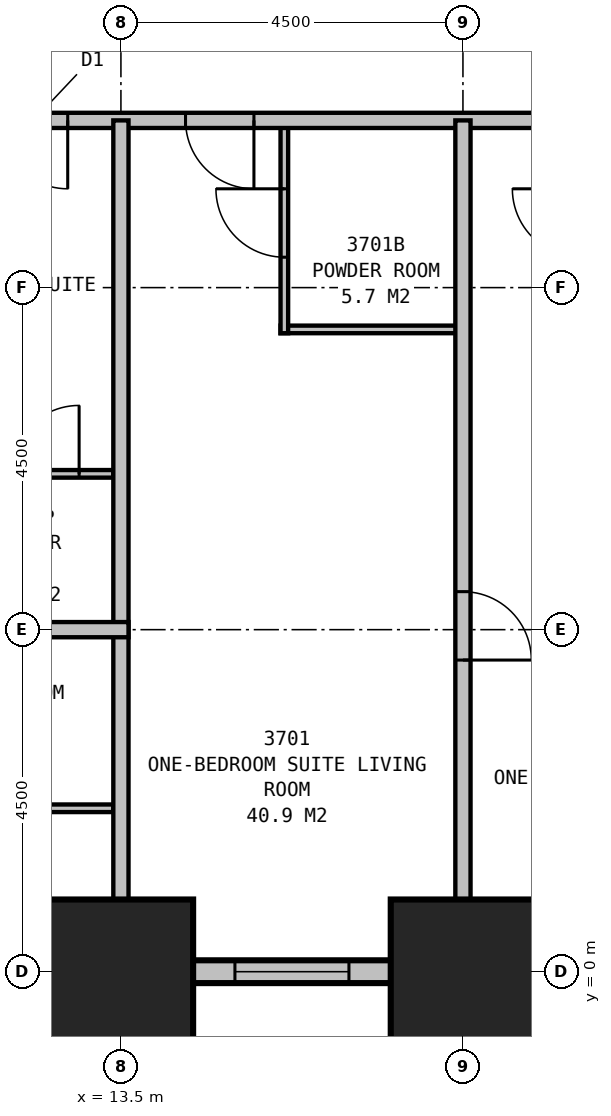
"""IFC4 building model, lengths in metres.
Left out: names, types, materials, properties, quantities, classifications, styles, units other than length and angle.
Written with IfcOpenShell. Run it as: python <this file> out.ifc"""

import sys

from ifc_helpers import new_model, si_unit, direction, frame, frame_2d, origin, origin_2d, place, context, subcontext, project, spatial, rectangle, extrude, element, fill, save


model = new_model("IFC4")
c1 = context("Model", 3, precision=1e-05, world=origin(), true_north=direction((0.0, 1.0)))
c2 = subcontext(c1, "Body", "Model", "MODEL_VIEW")
j1 = project(units=[si_unit("LENGTHUNIT", "METRE"), si_unit("PLANEANGLEUNIT", "RADIAN")], contexts=[c1])
p1 = place(None, origin())
s1 = spatial("IfcSite", under=j1, at=p1, CompositionType="ELEMENT")
p2 = place(p1, origin())
s2 = spatial("IfcBuilding", under=s1, at=p2, CompositionType="ELEMENT")
p3 = place(p2, frame((0.0, 0.0, 142.4)))
s3 = spatial("IfcBuildingStorey", under=s2, at=p3, CompositionType="ELEMENT", Elevation=142.4)
for number, where, z_axis, x_axis in (
    (1, (13.5, 0.0, 0.0), (0.0, 0.0, 1.0), (1.0, 0.0, 0.0)),
    (2, (18.0, 0.0, 0.0), (0.0, 0.0, 1.0), (1.0, 0.0, 0.0)),
):
    element("IfcColumn", number, at=place(p3, frame(where, z_axis=z_axis, x_axis=x_axis)), inside=s3, PredefinedType="COLUMN", context=c2, shape_type="SweptSolid", body=[
        extrude(rectangle(XDim=1.9, YDim=1.9, at=origin_2d()), origin(), (0.0, 0.0, 1.0), 3.5),
    ])
p4 = place(p3, frame((4.35, 0.0, 0.0), z_axis=(0.0, 0.0, 1.0), x_axis=(1.0, 0.0, 0.0)))
e3 = element("IfcWall", 3, at=p4, inside=s3, PredefinedType="STANDARD", context=c2, shape_type="SweptSolid", body=[
    extrude(rectangle(XDim=40.8, YDim=0.3, at=frame_2d((20.4, 0.0))), origin(), (0.0, 0.0, 1.0), 2.1),
])
p5 = place(p4, frame((1.65, 0.0, 0.5)))
e4 = element("IfcOpeningElement", 4, at=p5, cuts=e3, PredefinedType="OPENING", context=c2, shape_type="SweptSolid", body=[
    extrude(rectangle(XDim=1.5, YDim=1.4, at=frame_2d((0.75, 0.7))), frame((0.0, 0.16, 0.0), z_axis=(0.0, -1.0, 0.0), x_axis=(1.0, 0.0, 0.0)), (0.0, 0.0, 1.0), 0.32),
])
p6 = place(p4, frame((6.15, 0.0, 0.5)))
e5 = element("IfcOpeningElement", 5, at=p6, cuts=e3, PredefinedType="OPENING", context=c2, shape_type="SweptSolid", body=[
    extrude(rectangle(XDim=1.5, YDim=1.4, at=frame_2d((0.75, 0.7))), frame((0.0, 0.16, 0.0), z_axis=(0.0, -1.0, 0.0), x_axis=(1.0, 0.0, 0.0)), (0.0, 0.0, 1.0), 0.32),
])
p7 = place(p4, frame((10.65, 0.0, 0.5)))
e6 = element("IfcOpeningElement", 6, at=p7, cuts=e3, PredefinedType="OPENING", context=c2, shape_type="SweptSolid", body=[
    extrude(rectangle(XDim=1.5, YDim=1.4, at=frame_2d((0.75, 0.7))), frame((0.0, 0.16, 0.0), z_axis=(0.0, -1.0, 0.0), x_axis=(1.0, 0.0, 0.0)), (0.0, 0.0, 1.0), 0.32),
])
p8 = place(p4, frame((15.15, 0.0, 0.5)))
e7 = element("IfcOpeningElement", 7, at=p8, cuts=e3, PredefinedType="OPENING", context=c2, shape_type="SweptSolid", body=[
    extrude(rectangle(XDim=1.5, YDim=1.4, at=frame_2d((0.75, 0.7))), frame((0.0, 0.16, 0.0), z_axis=(0.0, -1.0, 0.0), x_axis=(1.0, 0.0, 0.0)), (0.0, 0.0, 1.0), 0.32),
])
p9 = place(p4, frame((19.65, 0.0, 0.5)))
e8 = element("IfcOpeningElement", 8, at=p9, cuts=e3, PredefinedType="OPENING", context=c2, shape_type="SweptSolid", body=[
    extrude(rectangle(XDim=1.5, YDim=1.4, at=frame_2d((0.75, 0.7))), frame((0.0, 0.16, 0.0), z_axis=(0.0, -1.0, 0.0), x_axis=(1.0, 0.0, 0.0)), (0.0, 0.0, 1.0), 0.32),
])
p10 = place(p4, frame((24.15, 0.0, 0.5)))
e9 = element("IfcOpeningElement", 9, at=p10, cuts=e3, PredefinedType="OPENING", context=c2, shape_type="SweptSolid", body=[
    extrude(rectangle(XDim=1.5, YDim=1.4, at=frame_2d((0.75, 0.7))), frame((0.0, 0.16, 0.0), z_axis=(0.0, -1.0, 0.0), x_axis=(1.0, 0.0, 0.0)), (0.0, 0.0, 1.0), 0.32),
])
p11 = place(p4, frame((28.65, 0.0, 0.5)))
e10 = element("IfcOpeningElement", 10, at=p11, cuts=e3, PredefinedType="OPENING", context=c2, shape_type="SweptSolid", body=[
    extrude(rectangle(XDim=1.5, YDim=1.4, at=frame_2d((0.75, 0.7))), frame((0.0, 0.16, 0.0), z_axis=(0.0, -1.0, 0.0), x_axis=(1.0, 0.0, 0.0)), (0.0, 0.0, 1.0), 0.32),
])
p12 = place(p4, frame((33.15, 0.0, 0.5)))
e11 = element("IfcOpeningElement", 11, at=p12, cuts=e3, PredefinedType="OPENING", context=c2, shape_type="SweptSolid", body=[
    extrude(rectangle(XDim=1.5, YDim=1.4, at=frame_2d((0.75, 0.7))), frame((0.0, 0.16, 0.0), z_axis=(0.0, -1.0, 0.0), x_axis=(1.0, 0.0, 0.0)), (0.0, 0.0, 1.0), 0.32),
])
p13 = place(p4, frame((37.65, 0.0, 0.5)))
e12 = element("IfcOpeningElement", 12, at=p13, cuts=e3, PredefinedType="OPENING", context=c2, shape_type="SweptSolid", body=[
    extrude(rectangle(XDim=1.5, YDim=1.4, at=frame_2d((0.75, 0.7))), frame((0.0, 0.16, 0.0), z_axis=(0.0, -1.0, 0.0), x_axis=(1.0, 0.0, 0.0)), (0.0, 0.0, 1.0), 0.32),
])
p14 = place(p3, frame((11.2, 11.2, 0.0), z_axis=(0.0, 0.0, 1.0), x_axis=(1.0, 0.0, 0.0)))
e13 = element("IfcWall", 13, at=p14, inside=s3, PredefinedType="PARTITIONING", context=c2, shape_type="SweptSolid", body=[
    extrude(rectangle(XDim=27.1, YDim=0.2, at=frame_2d((13.55, 0.0))), origin(), (0.0, 0.0, 1.0), 3.25),
])
p15 = place(p14, frame((4.05, 0.0, 0.0), z_axis=(0.0, 0.0, 1.0), x_axis=(-1.0, 0.0, 0.0)))
e14 = element("IfcOpeningElement", 14, at=p15, cuts=e13, PredefinedType="OPENING", context=c2, shape_type="SweptSolid", body=[
    extrude(rectangle(XDim=0.9, YDim=2.1, at=frame_2d((0.45, 1.05))), frame((0.0, 0.11, 0.0), z_axis=(0.0, -1.0, 0.0), x_axis=(1.0, 0.0, 0.0)), (0.0, 0.0, 1.0), 0.22),
])
p16 = place(p14, frame((12.65, 0.0, 0.0), z_axis=(0.0, 0.0, 1.0), x_axis=(-1.0, 0.0, 0.0)))
e15 = element("IfcOpeningElement", 15, at=p16, cuts=e13, PredefinedType="OPENING", context=c2, shape_type="SweptSolid", body=[
    extrude(rectangle(XDim=1.0, YDim=2.1, at=frame_2d((0.5, 1.05))), frame((0.0, 0.11, 0.0), z_axis=(0.0, -1.0, 0.0), x_axis=(1.0, 0.0, 0.0)), (0.0, 0.0, 1.0), 0.22),
])
p17 = place(p14, frame((19.45, 0.0, 0.0), z_axis=(0.0, 0.0, 1.0), x_axis=(-1.0, 0.0, 0.0)))
e16 = element("IfcOpeningElement", 16, at=p17, cuts=e13, PredefinedType="OPENING", context=c2, shape_type="SweptSolid", body=[
    extrude(rectangle(XDim=0.9, YDim=2.1, at=frame_2d((0.45, 1.05))), frame((0.0, 0.11, 0.0), z_axis=(0.0, -1.0, 0.0), x_axis=(1.0, 0.0, 0.0)), (0.0, 0.0, 1.0), 0.22),
])
p18 = place(p14, frame((1.6, 0.0, 0.0), z_axis=(0.0, 0.0, 1.0), x_axis=(-1.0, 0.0, 0.0)))
e17 = element("IfcOpeningElement", 17, at=p18, cuts=e13, PredefinedType="OPENING", context=c2, shape_type="SweptSolid", body=[
    extrude(rectangle(XDim=0.9, YDim=2.1, at=frame_2d((0.45, 1.05))), frame((0.0, 0.11, 0.0), z_axis=(0.0, -1.0, 0.0), x_axis=(1.0, 0.0, 0.0)), (0.0, 0.0, 1.0), 0.22),
])
p19 = place(p14, frame((26.4, 0.0, 0.0), z_axis=(0.0, 0.0, 1.0), x_axis=(-1.0, 0.0, 0.0)))
e18 = element("IfcOpeningElement", 18, at=p19, cuts=e13, PredefinedType="OPENING", context=c2, shape_type="SweptSolid", body=[
    extrude(rectangle(XDim=0.9, YDim=2.1, at=frame_2d((0.45, 1.05))), frame((0.0, 0.11, 0.0), z_axis=(0.0, -1.0, 0.0), x_axis=(1.0, 0.0, 0.0)), (0.0, 0.0, 1.0), 0.22),
])
p20 = place(p3, frame((18.0, 11.2, 0.0), z_axis=(0.0, 0.0, 1.0), x_axis=(0.0, -1.0, 0.0)))
e19 = element("IfcWall", 19, at=p20, inside=s3, PredefinedType="PARTITIONING", context=c2, shape_type="SweptSolid", body=[
    extrude(rectangle(XDim=11.2, YDim=0.2, at=frame_2d((5.6, 0.0))), origin(), (0.0, 0.0, 1.0), 2.2),
])
p21 = place(p20, frame((6.2, 0.0, 0.0)))
e20 = element("IfcOpeningElement", 20, at=p21, cuts=e19, PredefinedType="OPENING", context=c2, shape_type="SweptSolid", body=[
    extrude(rectangle(XDim=0.9, YDim=2.1, at=frame_2d((0.45, 1.05))), frame((0.0, 0.11, 0.0), z_axis=(0.0, -1.0, 0.0), x_axis=(1.0, 0.0, 0.0)), (0.0, 0.0, 1.0), 0.22),
])
p22 = place(p3, frame((15.6, 8.45, 0.0), z_axis=(0.0, 0.0, 1.0), x_axis=(1.0, 0.0, 0.0)))
e21 = element("IfcWall", 21, at=p22, inside=s3, PredefinedType="PLUMBINGWALL", context=c2, shape_type="SweptSolid", body=[
    extrude(rectangle(XDim=2.4, YDim=0.1, at=frame_2d((1.2, 0.0))), origin(), (0.0, 0.0, 1.0), 3.25),
])
p23 = place(p3, frame((15.65, 11.2, 0.0), z_axis=(0.0, 0.0, 1.0), x_axis=(0.0, -1.0, 0.0)))
e22 = element("IfcWall", 22, at=p23, inside=s3, PredefinedType="PLUMBINGWALL", context=c2, shape_type="SweptSolid", body=[
    extrude(rectangle(XDim=2.8, YDim=0.1, at=frame_2d((1.4, 0.0))), origin(), (0.0, 0.0, 1.0), 3.25),
])
p24 = place(p23, frame((1.8, 0.0, 0.0), z_axis=(0.0, 0.0, 1.0), x_axis=(-1.0, 0.0, 0.0)))
e23 = element("IfcOpeningElement", 23, at=p24, cuts=e22, PredefinedType="OPENING", context=c2, shape_type="SweptSolid", body=[
    extrude(rectangle(XDim=0.9, YDim=2.1, at=frame_2d((0.45, 1.05))), frame((0.0, 0.06, 0.0), z_axis=(0.0, -1.0, 0.0), x_axis=(1.0, 0.0, 0.0)), (0.0, 0.0, 1.0), 0.12),
])
p25 = place(p3, frame((13.5, 11.2, 0.0), z_axis=(0.0, 0.0, 1.0), x_axis=(0.0, -1.0, 0.0)))
e24 = element("IfcWall", 24, at=p25, inside=s3, PredefinedType="PARTITIONING", context=c2, shape_type="SweptSolid", body=[
    extrude(rectangle(XDim=11.2, YDim=0.2, at=frame_2d((5.6, 0.0))), origin(), (0.0, 0.0, 1.0), 2.2),
])
p26 = place(p3, frame((13.6, 4.5, 0.0), z_axis=(0.0, 0.0, 1.0), x_axis=(-1.0, 0.0, 0.0)))
e25 = element("IfcWall", 25, at=p26, inside=s3, PredefinedType="PARTITIONING", context=c2, shape_type="SweptSolid", body=[
    extrude(rectangle(XDim=9.1, YDim=0.2, at=frame_2d((4.55, 0.0))), origin(), (0.0, 0.0, 1.0), 3.25),
])
p27 = place(p26, frame((7.1, 0.0, 0.0)))
e26 = element("IfcOpeningElement", 26, at=p27, cuts=e25, PredefinedType="OPENING", context=c2, shape_type="SweptSolid", body=[
    extrude(rectangle(XDim=0.9, YDim=2.1, at=frame_2d((0.45, 1.05))), frame((0.0, 0.11, 0.0), z_axis=(0.0, -1.0, 0.0), x_axis=(1.0, 0.0, 0.0)), (0.0, 0.0, 1.0), 0.22),
])
p28 = place(p3, frame((13.4, 6.55, 0.0), z_axis=(0.0, 0.0, 1.0), x_axis=(-1.0, 0.0, 0.0)))
e27 = element("IfcWall", 27, at=p28, inside=s3, PredefinedType="PLUMBINGWALL", context=c2, shape_type="SweptSolid", body=[
    extrude(rectangle(XDim=1.8, YDim=0.1, at=frame_2d((0.9, 0.0))), origin(), (0.0, 0.0, 1.0), 3.25),
])
p29 = place(p28, frame((1.35, 0.0, 0.0), z_axis=(0.0, 0.0, 1.0), x_axis=(-1.0, 0.0, 0.0)))
e28 = element("IfcOpeningElement", 28, at=p29, cuts=e27, PredefinedType="OPENING", context=c2, shape_type="SweptSolid", body=[
    extrude(rectangle(XDim=0.9, YDim=2.1, at=frame_2d((0.45, 1.05))), frame((0.0, 0.06, 0.0), z_axis=(0.0, -1.0, 0.0), x_axis=(1.0, 0.0, 0.0)), (0.0, 0.0, 1.0), 0.12),
])
p30 = place(p3, frame((13.4, 2.15, 0.0), z_axis=(0.0, 0.0, 1.0), x_axis=(-1.0, 0.0, 0.0)))
e29 = element("IfcWall", 29, at=p30, inside=s3, PredefinedType="PLUMBINGWALL", context=c2, shape_type="SweptSolid", body=[
    extrude(rectangle(XDim=3.5, YDim=0.1, at=frame_2d((1.75, 0.0))), origin(), (0.0, 0.0, 1.0), 3.25),
])
p31 = place(p30, frame((0.9, 0.0, 0.0)))
e30 = element("IfcOpeningElement", 30, at=p31, cuts=e29, PredefinedType="OPENING", context=c2, shape_type="SweptSolid", body=[
    extrude(rectangle(XDim=0.9, YDim=2.1, at=frame_2d((0.45, 1.05))), frame((0.0, 0.06, 0.0), z_axis=(0.0, -1.0, 0.0), x_axis=(1.0, 0.0, 0.0)), (0.0, 0.0, 1.0), 0.12),
])
p32 = place(p7, origin())
e31 = element("IfcWindow", 31, at=p32, inside=s3, PartitioningType="SINGLE_PANEL", PredefinedType="WINDOW", context=c2, shape_type="SweptSolid", body=[
    extrude(rectangle(XDim=1.5, YDim=1.4, at=frame_2d((0.75, 0.7))), frame((0.0, 0.03, 0.0), z_axis=(0.0, -1.0, 0.0), x_axis=(1.0, 0.0, 0.0)), (0.0, 0.0, 1.0), 0.06),
])
fill(e6, e31)
p33 = place(p15, origin())
e32 = element("IfcDoor", 32, at=p33, inside=s3, OperationType="SINGLE_SWING_LEFT", PredefinedType="DOOR", context=c2, shape_type="SweptSolid", body=[
    extrude(rectangle(XDim=0.9, YDim=2.1, at=frame_2d((0.45, 1.05))), frame((0.0, 0.025, 0.0), z_axis=(0.0, -1.0, 0.0), x_axis=(1.0, 0.0, 0.0)), (0.0, 0.0, 1.0), 0.05),
])
fill(e14, e32)
p34 = place(p18, origin())
e33 = element("IfcDoor", 33, at=p34, inside=s3, OperationType="SINGLE_SWING_LEFT", PredefinedType="DOOR", context=c2, shape_type="SweptSolid", body=[
    extrude(rectangle(XDim=0.9, YDim=2.1, at=frame_2d((0.45, 1.05))), frame((0.0, 0.025, 0.0), z_axis=(0.0, -1.0, 0.0), x_axis=(1.0, 0.0, 0.0)), (0.0, 0.0, 1.0), 0.05),
])
fill(e17, e33)
p35 = place(p21, origin())
e34 = element("IfcDoor", 34, at=p35, inside=s3, OperationType="SINGLE_SWING_RIGHT", PredefinedType="DOOR", context=c2, shape_type="SweptSolid", body=[
    extrude(rectangle(XDim=0.9, YDim=2.1, at=frame_2d((0.45, 1.05))), frame((0.0, 0.025, 0.0), z_axis=(0.0, -1.0, 0.0), x_axis=(1.0, 0.0, 0.0)), (0.0, 0.0, 1.0), 0.05),
])
fill(e20, e34)
p36 = place(p24, origin())
e35 = element("IfcDoor", 35, at=p36, inside=s3, OperationType="SINGLE_SWING_RIGHT", PredefinedType="DOOR", context=c2, shape_type="SweptSolid", body=[
    extrude(rectangle(XDim=0.9, YDim=2.1, at=frame_2d((0.45, 1.05))), frame((0.0, 0.025, 0.0), z_axis=(0.0, -1.0, 0.0), x_axis=(1.0, 0.0, 0.0)), (0.0, 0.0, 1.0), 0.05),
])
fill(e23, e35)
p37 = place(p29, origin())
e36 = element("IfcDoor", 36, at=p37, inside=s3, OperationType="SINGLE_SWING_RIGHT", PredefinedType="DOOR", context=c2, shape_type="SweptSolid", body=[
    extrude(rectangle(XDim=0.9, YDim=2.1, at=frame_2d((0.45, 1.05))), frame((0.0, 0.025, 0.0), z_axis=(0.0, -1.0, 0.0), x_axis=(1.0, 0.0, 0.0)), (0.0, 0.0, 1.0), 0.05),
])
fill(e28, e36)
save(model, sys.argv[1])
